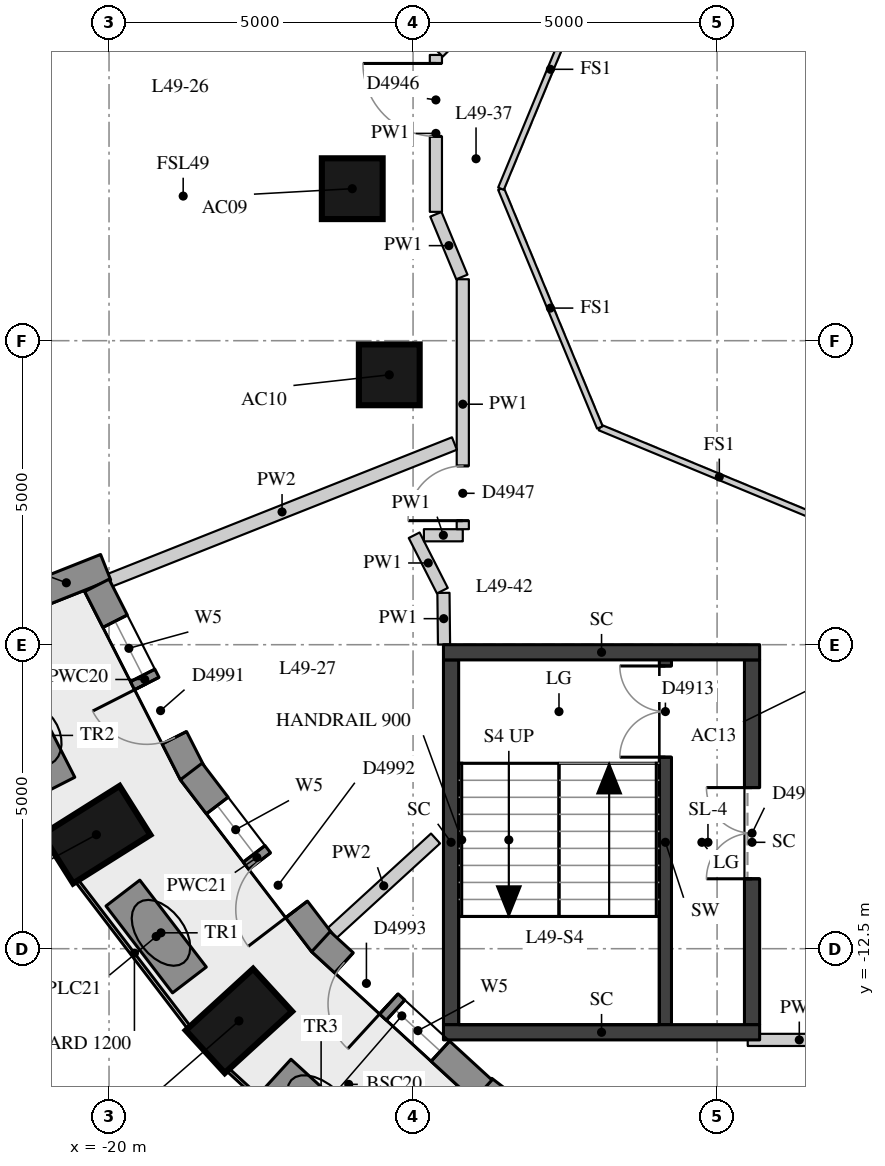
"""IFC4 building model, lengths in metres.
Left out: names, types, materials, properties, quantities, classifications, styles, units other than length and angle.
Written with IfcOpenShell. Run it as: python <this file> out.ifc"""

import sys

from ifc_helpers import new_model, si_unit, direction, frame, frame_2d, origin, origin_2d, place, context, subcontext, project, spatial, rectangle, extrude, element, fill, save


model = new_model("IFC4")
c1 = context("Model", 3, precision=1e-05, world=origin(), true_north=direction((0.0, 1.0)))
c2 = subcontext(c1, "Body", "Model", "MODEL_VIEW")
j1 = project(units=[si_unit("LENGTHUNIT", "METRE"), si_unit("PLANEANGLEUNIT", "RADIAN")], contexts=[c1])
p1 = place(None, origin())
s1 = spatial("IfcSite", under=j1, at=p1, CompositionType="ELEMENT")
p2 = place(p1, origin())
s2 = spatial("IfcBuilding", under=s1, at=p2, CompositionType="ELEMENT")
p3 = place(p2, frame((0.0, 0.0, 174.8)))
s3 = spatial("IfcBuildingStorey", under=s2, at=p3, CompositionType="ELEMENT", Elevation=174.8)
for number, where, z_axis, x_axis in (
    (1, (-20.208, -10.625, 0.0), (0.0, 0.0, 1.0), (-0.846, -0.533, 0.0)),
    (2, (-17.864, -13.688, 0.0), (0.0, 0.0, 1.0), (-0.738, -0.675, 0.0)),
):
    element("IfcColumn", number, at=place(p3, frame(where, z_axis=z_axis, x_axis=x_axis)), inside=s3, PredefinedType="COLUMN", context=c2, shape_type="SweptSolid", body=[
        extrude(rectangle(XDim=1.5, YDim=0.95, at=origin_2d()), origin(), (0.0, 0.0, 1.0), 3.3),
    ])
for number, where, z_axis, x_axis in (
    (3, (-16.0, 0.0, 0.0), (0.0, 0.0, 1.0), (1.0, 0.0, 0.0)),
    (4, (-15.391, -3.062, 0.0), (0.0, 0.0, 1.0), (1.0, 0.0, 0.0)),
):
    element("IfcColumn", number, at=place(p3, frame(where, z_axis=z_axis, x_axis=x_axis)), inside=s3, PredefinedType="COLUMN", context=c2, shape_type="SweptSolid", body=[
        extrude(rectangle(XDim=1.0, YDim=1.0, at=origin_2d()), origin(), (0.0, 0.0, 1.0), 3.3),
    ])
p4 = place(p3, frame((-21.348, -6.738, 0.0), z_axis=(0.0, 0.0, 1.0), x_axis=(0.929514600716, 0.368785312961, 0.0)))
e5 = element("IfcWall", 5, at=p4, inside=s3, PredefinedType="SOLIDWALL", context=c2, shape_type="SweptSolid", body=[
    extrude(rectangle(XDim=1.39, YDim=0.45, at=frame_2d((0.695, 0.0))), origin(), (0.0, 0.0, 1.0), 3.02),
])
p5 = place(p3, frame((-14.375, -15.871, 0.0), z_axis=(0.0, 0.0, 1.0), x_axis=(0.609982261713, 0.792415068253, 0.0)))
e6 = element("IfcWall", 6, at=p5, inside=s3, PredefinedType="SOLIDWALL", context=c2, shape_type="SweptSolid", body=[
    extrude(rectangle(XDim=1.39, YDim=0.45, at=frame_2d((0.695, 0.0))), origin(), (0.0, 0.0, 1.0), 2.57),
])
p6 = place(p3, frame((-20.2, -6.524, 0.0), z_axis=(0.0, 0.0, 1.0), x_axis=(0.453222057065, -0.891397648073, 0.0)))
e7 = element("IfcWall", 7, at=p6, inside=s3, PredefinedType="SOLIDWALL", context=c2, shape_type="SweptSolid", body=[
    extrude(rectangle(XDim=3.472, YDim=0.45, at=frame_2d((1.736, 0.0))), origin(), (0.0, 0.0, 1.0), 3.02),
])
p7 = place(p6, frame((0.661, 0.0, 0.4)))
e8 = element("IfcOpeningElement", 8, at=p7, cuts=e7, PredefinedType="OPENING", context=c2, shape_type="SweptSolid", body=[
    extrude(rectangle(XDim=1.0, YDim=1.75, at=frame_2d((0.5, 0.875))), frame((0.0, 0.235, 0.0), z_axis=(0.0, -1.0, 0.0), x_axis=(1.0, 0.0, 0.0)), (0.0, 0.0, 1.0), 0.47),
])
p8 = place(p6, frame((1.811, 0.0, 0.0)))
e9 = element("IfcOpeningElement", 9, at=p8, cuts=e7, PredefinedType="OPENING", context=c2, shape_type="SweptSolid", body=[
    extrude(rectangle(XDim=1.0, YDim=2.15, at=frame_2d((0.5, 1.075))), frame((0.0, 0.235, 0.0), z_axis=(0.0, -1.0, 0.0), x_axis=(1.0, 0.0, 0.0)), (0.0, 0.0, 1.0), 0.47),
])
p9 = place(p3, frame((-18.648, -9.585, 0.0), z_axis=(0.0, 0.0, 1.0), x_axis=(0.606795400684, -0.794858063876, 0.0)))
e10 = element("IfcWall", 10, at=p9, inside=s3, PredefinedType="SOLIDWALL", context=c2, shape_type="SweptSolid", body=[
    extrude(rectangle(XDim=3.558, YDim=0.45, at=frame_2d((1.779, 0.0))), origin(), (0.0, 0.0, 1.0), 3.02),
])
p10 = place(p9, frame((0.704, 0.0, 0.4)))
e11 = element("IfcOpeningElement", 11, at=p10, cuts=e10, PredefinedType="OPENING", context=c2, shape_type="SweptSolid", body=[
    extrude(rectangle(XDim=1.0, YDim=1.75, at=frame_2d((0.5, 0.875))), frame((0.0, 0.235, 0.0), z_axis=(0.0, -1.0, 0.0), x_axis=(1.0, 0.0, 0.0)), (0.0, 0.0, 1.0), 0.47),
])
p11 = place(p9, frame((1.854, 0.0, 0.0)))
e12 = element("IfcOpeningElement", 12, at=p11, cuts=e10, PredefinedType="OPENING", context=c2, shape_type="SweptSolid", body=[
    extrude(rectangle(XDim=1.0, YDim=2.15, at=frame_2d((0.5, 1.075))), frame((0.0, 0.235, 0.0), z_axis=(0.0, -1.0, 0.0), x_axis=(1.0, 0.0, 0.0)), (0.0, 0.0, 1.0), 0.47),
])
p12 = place(p3, frame((-16.515, -12.384, 0.0), z_axis=(0.0, 0.0, 1.0), x_axis=(0.736968915604, -0.675926636133, 0.0)))
e13 = element("IfcWall", 13, at=p12, inside=s3, PredefinedType="SOLIDWALL", context=c2, shape_type="SweptSolid", body=[
    extrude(rectangle(XDim=3.612, YDim=0.45, at=frame_2d((1.806, 0.0))), origin(), (0.0, 0.0, 1.0), 3.02),
])
p13 = place(p12, frame((1.665, 0.0, 0.4)))
e14 = element("IfcOpeningElement", 14, at=p13, cuts=e13, PredefinedType="OPENING", context=c2, shape_type="SweptSolid", body=[
    extrude(rectangle(XDim=1.0, YDim=1.75, at=frame_2d((0.5, 0.875))), frame((0.0, 0.235, 0.0), z_axis=(0.0, -1.0, 0.0), x_axis=(1.0, 0.0, 0.0)), (0.0, 0.0, 1.0), 0.47),
])
p14 = place(p12, frame((0.515, 0.0, 0.0)))
e15 = element("IfcOpeningElement", 15, at=p14, cuts=e13, PredefinedType="OPENING", context=c2, shape_type="SweptSolid", body=[
    extrude(rectangle(XDim=1.0, YDim=2.15, at=frame_2d((0.5, 1.075))), frame((0.0, 0.235, 0.0), z_axis=(0.0, -1.0, 0.0), x_axis=(1.0, 0.0, 0.0)), (0.0, 0.0, 1.0), 0.47),
])
for number, where, z_axis, x_axis in (
    (16, (-21.692, -8.235, 0.0), (0.0, 0.0, 1.0), (0.454, -0.891, 0.0)),
    (17, (-19.772, -11.585, 0.0), (0.0, 0.0, 1.0), (0.608, -0.794, 0.0)),
    (18, (-17.244, -14.576, 0.0), (0.0, 0.0, 1.0), (0.738, -0.675, 0.0)),
):
    element("IfcWall", number, at=place(p3, frame(where, z_axis=z_axis, x_axis=x_axis)), inside=s3, PredefinedType="USERDEFINED", context=c2, shape_type="SweptSolid", body=[
        extrude(rectangle(XDim=1.8, YDim=0.7, at=frame_2d((0.9, 0.0))), origin(), (0.0, 0.0, 1.0), 0.75),
    ])
p15 = place(p3, frame((-10.85, -13.75, 0.0), z_axis=(0.0, 0.0, 1.0), x_axis=(0.0, 1.0, 0.0)))
e19 = element("IfcWall", 19, at=p15, inside=s3, PredefinedType="SHEAR", context=c2, shape_type="SweptSolid", body=[
    extrude(rectangle(XDim=6.0, YDim=0.2, at=frame_2d((3.0, 0.0))), origin(), (0.0, 0.0, 1.0), 3.02),
])
p16 = place(p15, frame((4.4, 0.0, 0.0)))
e20 = element("IfcOpeningElement", 20, at=p16, cuts=e19, PredefinedType="OPENING", context=c2, shape_type="SweptSolid", body=[
    extrude(rectangle(XDim=1.5, YDim=2.1, at=frame_2d((0.75, 1.05))), frame((0.0, 0.11, 0.0), z_axis=(0.0, -1.0, 0.0), x_axis=(1.0, 0.0, 0.0)), (0.0, 0.0, 1.0), 0.22),
])
p17 = place(p3, frame((-14.375, -13.75, -0.28), z_axis=(0.0, 0.0, 1.0), x_axis=(0.0, 1.0, 0.0)))
e21 = element("IfcWall", 21, at=p17, inside=s3, PredefinedType="SHEAR", context=c2, shape_type="SweptSolid", body=[
    extrude(rectangle(XDim=6.0, YDim=0.25, at=frame_2d((3.0, 0.0))), origin(), (0.0, 0.0, 1.0), 3.3),
])
p18 = place(p3, frame((-9.425, -13.75, -0.28), z_axis=(0.0, 0.0, 1.0), x_axis=(0.0, 1.0, 0.0)))
e22 = element("IfcWall", 22, at=p18, inside=s3, PredefinedType="SHEAR", context=c2, shape_type="SweptSolid", body=[
    extrude(rectangle(XDim=6.0, YDim=0.25, at=frame_2d((3.0, 0.0))), origin(), (0.0, 0.0, 1.0), 3.3),
])
p19 = place(p18, frame((2.4, 0.0, 0.28)))
e23 = element("IfcOpeningElement", 23, at=p19, cuts=e22, PredefinedType="OPENING", context=c2, shape_type="SweptSolid", body=[
    extrude(rectangle(XDim=1.5, YDim=2.1, at=frame_2d((0.75, 1.05))), frame((0.0, 0.135, 0.0), z_axis=(0.0, -1.0, 0.0), x_axis=(1.0, 0.0, 0.0)), (0.0, 0.0, 1.0), 0.27),
])
for number, where, z_axis, x_axis in (
    (24, (-14.5, -7.625, -0.28), (0.0, 0.0, 1.0), (1.0, 0.0, 0.0)),
    (25, (-14.5, -13.875, -0.28), (0.0, 0.0, 1.0), (1.0, 0.0, 0.0)),
):
    element("IfcWall", number, at=place(p3, frame(where, z_axis=z_axis, x_axis=x_axis)), inside=s3, PredefinedType="SHEAR", context=c2, shape_type="SweptSolid", body=[
        extrude(rectangle(XDim=5.2, YDim=0.25, at=frame_2d((2.6, 0.0))), origin(), (0.0, 0.0, 1.0), 3.3),
    ])
p20 = place(p3, frame((-7.8, -14.0, 0.0), z_axis=(0.0, 0.0, 1.0), x_axis=(-1.0, 0.0, 0.0)))
e26 = element("IfcWall", 26, at=p20, inside=s3, PredefinedType="PARTITIONING", context=c2, shape_type="SweptSolid", body=[
    extrude(rectangle(XDim=1.696, YDim=0.2, at=frame_2d((0.848, 0.0))), origin(), (0.0, 0.0, 1.0), 3.02),
])
p21 = place(p3, frame((-14.491, -7.496, 0.0), z_axis=(0.0, 0.0, 1.0), x_axis=(-0.010931452674, 0.999940249886, 0.0)))
e27 = element("IfcWall", 27, at=p21, inside=s3, PredefinedType="PARTITIONING", context=c2, shape_type="SweptSolid", body=[
    extrude(rectangle(XDim=0.849, YDim=0.2, at=frame_2d((0.424, 0.0))), origin(), (0.0, 0.0, 1.0), 3.02),
])
p22 = place(p3, frame((-14.518, -6.612, 0.0), z_axis=(0.0, 0.0, 1.0), x_axis=(-0.45321774915, 0.891399838375, 0.0)))
e28 = element("IfcWall", 28, at=p22, inside=s3, PredefinedType="PARTITIONING", context=c2, shape_type="SweptSolid", body=[
    extrude(rectangle(XDim=1.023, YDim=0.2, at=frame_2d((0.511, 0.0))), origin(), (0.0, 0.0, 1.0), 3.02),
])
p23 = place(p3, frame((-14.822, -5.7, 0.0), z_axis=(0.0, 0.0, 1.0), x_axis=(1.0, 0.0, 0.0)))
e29 = element("IfcWall", 29, at=p23, inside=s3, PredefinedType="PARTITIONING", context=c2, shape_type="SweptSolid", body=[
    extrude(rectangle(XDim=0.639, YDim=0.2, at=frame_2d((0.32, 0.0))), origin(), (0.0, 0.0, 1.0), 3.02),
])
p24 = place(p3, frame((-14.182, -5.6, 0.0), z_axis=(0.0, 0.0, 1.0), x_axis=(0.0, 1.0, 0.0)))
e30 = element("IfcWall", 30, at=p24, inside=s3, PredefinedType="PARTITIONING", context=c2, shape_type="SweptSolid", body=[
    extrude(rectangle(XDim=4.111, YDim=0.2, at=frame_2d((2.055, 0.0))), origin(), (0.0, 0.0, 1.0), 3.02),
])
p25 = place(p24, frame((0.14, 0.0, 0.0)))
e31 = element("IfcOpeningElement", 31, at=p25, cuts=e30, PredefinedType="OPENING", context=c2, shape_type="SweptSolid", body=[
    extrude(rectangle(XDim=0.9, YDim=2.1, at=frame_2d((0.45, 1.05))), frame((0.0, 0.11, 0.0), z_axis=(0.0, -1.0, 0.0), x_axis=(1.0, 0.0, 0.0)), (0.0, 0.0, 1.0), 0.22),
])
p26 = place(p3, frame((-14.197, -1.452, 0.0), z_axis=(0.0, 0.0, 1.0), x_axis=(-0.382750994913, 0.923851544293, 0.0)))
e32 = element("IfcWall", 32, at=p26, inside=s3, PredefinedType="PARTITIONING", context=c2, shape_type="SweptSolid", body=[
    extrude(rectangle(XDim=1.116, YDim=0.2, at=frame_2d((0.558, 0.0))), origin(), (0.0, 0.0, 1.0), 3.02),
])
p27 = place(p3, frame((-14.625, -0.381, 0.0), z_axis=(0.0, 0.0, 1.0), x_axis=(0.0, 1.0, 0.0)))
e33 = element("IfcWall", 33, at=p27, inside=s3, PredefinedType="PARTITIONING", context=c2, shape_type="SweptSolid", body=[
    extrude(rectangle(XDim=2.581, YDim=0.2, at=frame_2d((1.291, 0.0))), origin(), (0.0, 0.0, 1.0), 3.02),
])
p28 = place(p27, frame((1.241, 0.0, 0.0)))
e34 = element("IfcOpeningElement", 34, at=p28, cuts=e33, PredefinedType="OPENING", context=c2, shape_type="SweptSolid", body=[
    extrude(rectangle(XDim=1.2, YDim=2.1, at=frame_2d((0.6, 1.05))), frame((0.0, 0.11, 0.0), z_axis=(0.0, -1.0, 0.0), x_axis=(1.0, 0.0, 0.0)), (0.0, 0.0, 1.0), 0.22),
])
p29 = place(p3, frame((-14.582, 2.242, 0.0), z_axis=(0.0, 0.0, 1.0), x_axis=(0.706890969579, 0.707322526948, 0.0)))
e35 = element("IfcWall", 35, at=p29, inside=s3, PredefinedType="PARTITIONING", context=c2, shape_type="SweptSolid", body=[
    extrude(rectangle(XDim=0.566, YDim=0.2, at=frame_2d((0.283, 0.0))), origin(), (0.0, 0.0, 1.0), 3.02),
])
p30 = place(p3, frame((-19.99, -6.441, 0.0), z_axis=(0.0, 0.0, 1.0), x_axis=(0.929499857769, 0.368822470042, 0.0)))
e36 = element("IfcWall", 36, at=p30, inside=s3, PredefinedType="PARTITIONING", context=c2, shape_type="SweptSolid", body=[
    extrude(rectangle(XDim=6.101, YDim=0.22, at=frame_2d((3.05, 0.0))), origin(), (0.0, 0.0, 1.0), 3.02),
])
p31 = place(p3, frame((-16.334, -12.245, 0.0), z_axis=(0.0, 0.0, 1.0), x_axis=(0.737917457379, 0.674890973487, 0.0)))
e37 = element("IfcWall", 37, at=p31, inside=s3, PredefinedType="PARTITIONING", context=c2, shape_type="SweptSolid", body=[
    extrude(rectangle(XDim=2.309, YDim=0.22, at=frame_2d((1.154, 0.0))), origin(), (0.0, 0.0, 1.0), 3.02),
])
for number, where, z_axis, x_axis in (
    (38, (-8.0, -5.554, 0.0), (0.0, 0.0, 1.0), (-0.924, 0.383, 0.0)),
    (39, (-11.927, -3.927, 0.0), (0.0, 0.0, 1.0), (-0.383, 0.924, 0.0)),
    (40, (-13.554, 0.0, 0.0), (0.0, 0.0, 1.0), (0.383, 0.924, 0.0)),
):
    element("IfcWall", number, at=place(p3, frame(where, z_axis=z_axis, x_axis=x_axis)), inside=s3, PredefinedType="PARTITIONING", context=c2, shape_type="SweptSolid", body=[
        extrude(rectangle(XDim=4.251, YDim=0.1, at=frame_2d((2.125, 0.0))), origin(), (0.0, 0.0, 1.0), 3.02),
    ])
p32 = place(p7, origin())
e41 = element("IfcWindow", 41, at=p32, inside=s3, PartitioningType="SINGLE_PANEL", PredefinedType="WINDOW", context=c2, shape_type="SweptSolid", body=[
    extrude(rectangle(XDim=1.0, YDim=1.75, at=frame_2d((0.5, 0.875))), frame((0.0, 0.035, 0.0), z_axis=(0.0, -1.0, 0.0), x_axis=(1.0, 0.0, 0.0)), (0.0, 0.0, 1.0), 0.06),
])
fill(e8, e41)
p33 = place(p8, frame((1.0, 0.0, 0.0), z_axis=(0.0, 0.0, 1.0), x_axis=(-1.0, 0.0, 0.0)))
e42 = element("IfcDoor", 42, at=p33, inside=s3, OperationType="SINGLE_SWING_RIGHT", PredefinedType="DOOR", context=c2, shape_type="SweptSolid", body=[
    extrude(rectangle(XDim=1.0, YDim=2.15, at=frame_2d((0.5, 1.075))), frame((0.0, 0.075, 0.0), z_axis=(0.0, -1.0, 0.0), x_axis=(1.0, 0.0, 0.0)), (0.0, 0.0, 1.0), 0.05),
])
fill(e9, e42)
p34 = place(p10, origin())
e43 = element("IfcWindow", 43, at=p34, inside=s3, PartitioningType="SINGLE_PANEL", PredefinedType="WINDOW", context=c2, shape_type="SweptSolid", body=[
    extrude(rectangle(XDim=1.0, YDim=1.75, at=frame_2d((0.5, 0.875))), frame((0.0, 0.035, 0.0), z_axis=(0.0, -1.0, 0.0), x_axis=(1.0, 0.0, 0.0)), (0.0, 0.0, 1.0), 0.06),
])
fill(e11, e43)
p35 = place(p11, frame((1.0, 0.0, 0.0), z_axis=(0.0, 0.0, 1.0), x_axis=(-1.0, 0.0, 0.0)))
e44 = element("IfcDoor", 44, at=p35, inside=s3, OperationType="SINGLE_SWING_LEFT", PredefinedType="DOOR", context=c2, shape_type="SweptSolid", body=[
    extrude(rectangle(XDim=1.0, YDim=2.15, at=frame_2d((0.5, 1.075))), frame((0.0, 0.075, 0.0), z_axis=(0.0, -1.0, 0.0), x_axis=(1.0, 0.0, 0.0)), (0.0, 0.0, 1.0), 0.05),
])
fill(e12, e44)
p36 = place(p13, origin())
e45 = element("IfcWindow", 45, at=p36, inside=s3, PartitioningType="SINGLE_PANEL", PredefinedType="WINDOW", context=c2, shape_type="SweptSolid", body=[
    extrude(rectangle(XDim=1.0, YDim=1.75, at=frame_2d((0.5, 0.875))), frame((0.0, 0.035, 0.0), z_axis=(0.0, -1.0, 0.0), x_axis=(1.0, 0.0, 0.0)), (0.0, 0.0, 1.0), 0.06),
])
fill(e14, e45)
p37 = place(p14, origin())
e46 = element("IfcDoor", 46, at=p37, inside=s3, OperationType="SINGLE_SWING_LEFT", PredefinedType="DOOR", context=c2, shape_type="SweptSolid", body=[
    extrude(rectangle(XDim=1.0, YDim=2.15, at=frame_2d((0.5, 1.075))), frame((0.0, -0.025, 0.0), z_axis=(0.0, -1.0, 0.0), x_axis=(1.0, 0.0, 0.0)), (0.0, 0.0, 1.0), 0.05),
])
fill(e15, e46)
p38 = place(p16, origin())
e47 = element("IfcDoor", 47, at=p38, inside=s3, OperationType="DOUBLE_DOOR_SINGLE_SWING", PredefinedType="DOOR", context=c2, shape_type="SweptSolid", body=[
    extrude(rectangle(XDim=1.5, YDim=2.1, at=frame_2d((0.75, 1.05))), frame((0.0, 0.025, 0.0), z_axis=(0.0, -1.0, 0.0), x_axis=(1.0, 0.0, 0.0)), (0.0, 0.0, 1.0), 0.05),
])
fill(e20, e47)
p39 = place(p19, origin())
e48 = element("IfcDoor", 48, at=p39, inside=s3, OperationType="DOUBLE_DOOR_SINGLE_SWING", PredefinedType="DOOR", context=c2, shape_type="SweptSolid", body=[
    extrude(rectangle(XDim=1.5, YDim=2.1, at=frame_2d((0.75, 1.05))), frame((0.0, 0.025, 0.0), z_axis=(0.0, -1.0, 0.0), x_axis=(1.0, 0.0, 0.0)), (0.0, 0.0, 1.0), 0.05),
])
fill(e23, e48)
p40 = place(p28, origin())
e49 = element("IfcDoor", 49, at=p40, inside=s3, OperationType="SINGLE_SWING_RIGHT", PredefinedType="DOOR", context=c2, shape_type="SweptSolid", body=[
    extrude(rectangle(XDim=1.2, YDim=2.1, at=frame_2d((0.6, 1.05))), frame((0.0, 0.025, 0.0), z_axis=(0.0, -1.0, 0.0), x_axis=(1.0, 0.0, 0.0)), (0.0, 0.0, 1.0), 0.05),
])
fill(e34, e49)
p41 = place(p25, origin())
e50 = element("IfcDoor", 50, at=p41, inside=s3, OperationType="SINGLE_SWING_LEFT", PredefinedType="DOOR", context=c2, shape_type="SweptSolid", body=[
    extrude(rectangle(XDim=0.9, YDim=2.1, at=frame_2d((0.45, 1.05))), frame((0.0, 0.025, 0.0), z_axis=(0.0, -1.0, 0.0), x_axis=(1.0, 0.0, 0.0)), (0.0, 0.0, 1.0), 0.05),
])
fill(e31, e50)
save(model, sys.argv[1])
